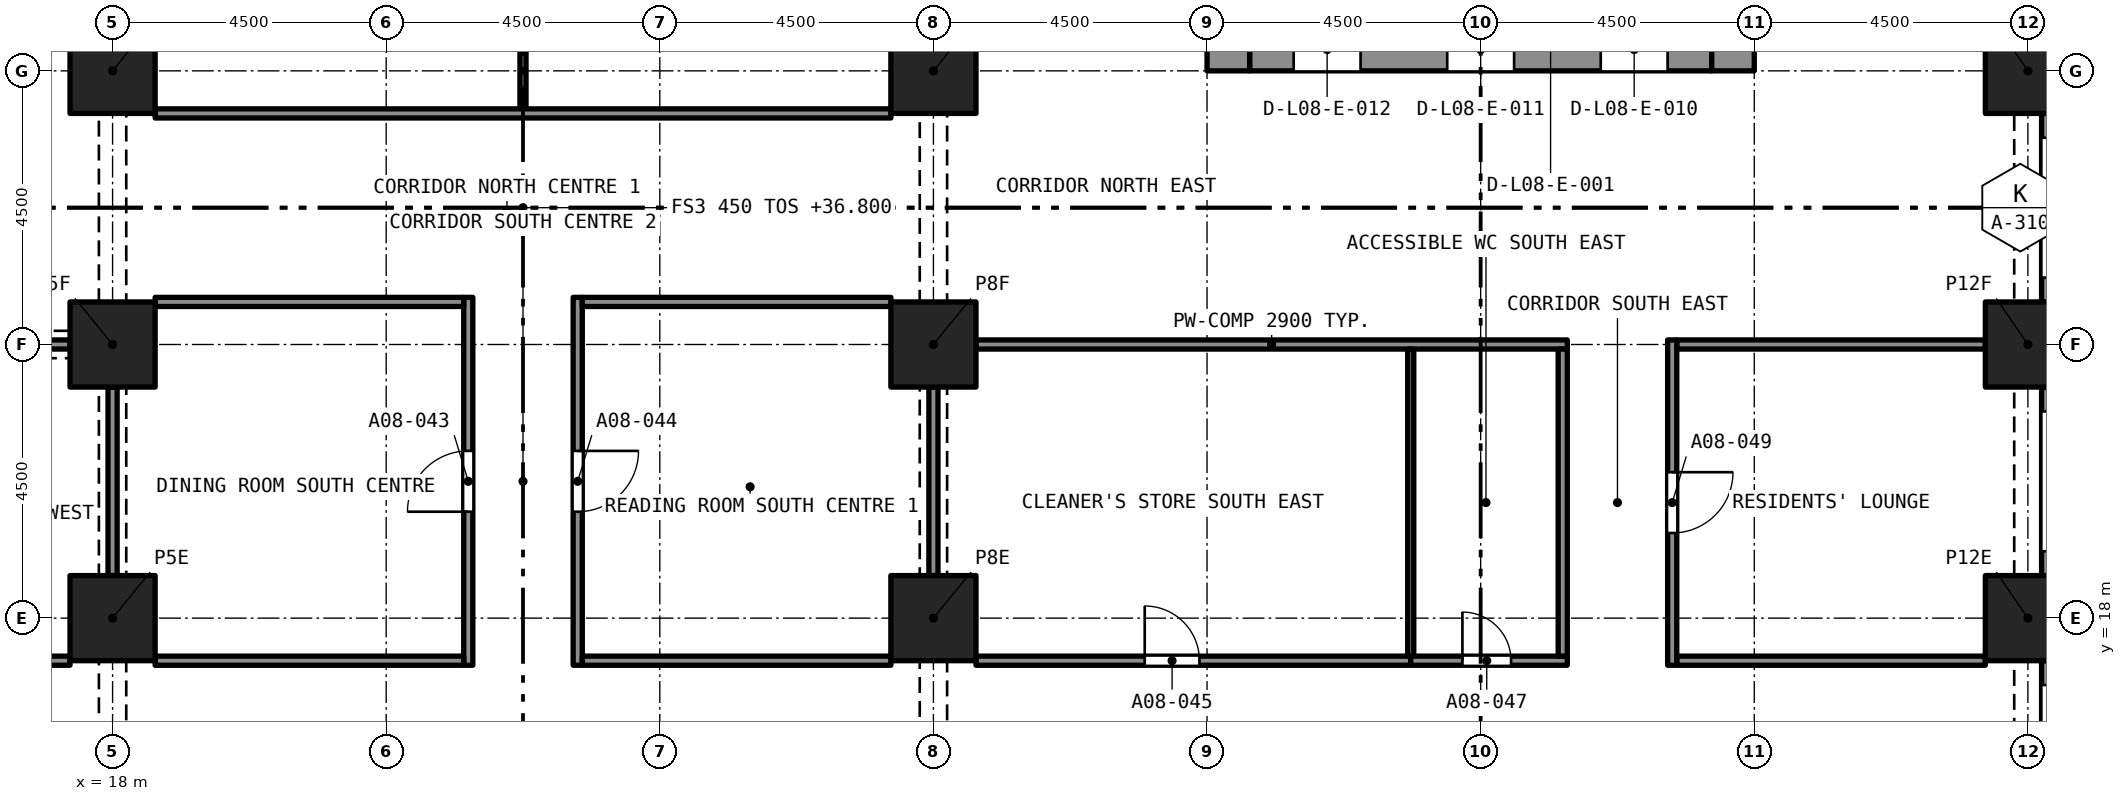
"""IFC4 building model, lengths in metres.
Left out: names, types, materials, properties, quantities, classifications, styles, units other than length and angle.
Written with IfcOpenShell. Run it as: python <this file> out.ifc"""

import sys

from ifc_helpers import new_model, si_unit, direction, frame, frame_2d, origin, origin_2d, place, context, subcontext, project, spatial, rectangle, extrude, element, fill, save


model = new_model("IFC4")
c1 = context("Model", 3, precision=1e-05, world=origin(), true_north=direction((0.0, 1.0)))
c2 = subcontext(c1, "Body", "Model", "MODEL_VIEW")
j1 = project(units=[si_unit("LENGTHUNIT", "METRE"), si_unit("PLANEANGLEUNIT", "RADIAN")], contexts=[c1])
p1 = place(None, origin())
s1 = spatial("IfcSite", under=j1, at=p1, CompositionType="ELEMENT")
p2 = place(p1, origin())
s2 = spatial("IfcBuilding", under=s1, at=p2, CompositionType="ELEMENT")
p3 = place(p2, frame((0.0, 0.0, 36.8)))
s3 = spatial("IfcBuildingStorey", under=s2, at=p3, CompositionType="ELEMENT", Elevation=36.8)
for number, where, z_axis, x_axis in (
    (1, (18.0, 18.0, 0.0), (0.0, 0.0, 1.0), (1.0, 0.0, 0.0)),
    (2, (31.5, 18.0, 0.0), (0.0, 0.0, 1.0), (1.0, 0.0, 0.0)),
    (3, (49.5, 18.0, 0.0), (0.0, 0.0, 1.0), (1.0, 0.0, 0.0)),
    (4, (18.0, 22.5, 0.0), (0.0, 0.0, 1.0), (1.0, 0.0, 0.0)),
    (5, (31.5, 22.5, 0.0), (0.0, 0.0, 1.0), (1.0, 0.0, 0.0)),
    (6, (49.5, 22.5, 0.0), (0.0, 0.0, 1.0), (1.0, 0.0, 0.0)),
    (7, (18.0, 27.0, 0.0), (0.0, 0.0, 1.0), (1.0, 0.0, 0.0)),
    (8, (31.5, 27.0, 0.0), (0.0, 0.0, 1.0), (1.0, 0.0, 0.0)),
    (9, (49.5, 27.0, 0.0), (0.0, 0.0, 1.0), (1.0, 0.0, 0.0)),
):
    element("IfcColumn", number, at=place(p3, frame(where, z_axis=z_axis, x_axis=x_axis)), inside=s3, PredefinedType="COLUMN", context=c2, shape_type="SweptSolid", body=[
        extrude(rectangle(XDim=1.4, YDim=1.4, at=origin_2d()), origin(), (0.0, 0.0, 1.0), 3.2),
    ])
p4 = place(p3, frame((36.7, 27.35, 0.0), z_axis=(0.0, 0.0, 1.0), x_axis=(1.0, 0.0, 0.0)))
e10 = element("IfcWall", 10, at=p4, inside=s3, PredefinedType="SOLIDWALL", context=c2, shape_type="SweptSolid", body=[
    extrude(rectangle(XDim=7.6, YDim=0.7, at=frame_2d((3.8, 0.0))), origin(), (0.0, 0.0, 1.0), 3.2),
])
p5 = place(p4, frame((5.775, 0.0, 0.0)))
e11 = element("IfcOpeningElement", 11, at=p5, cuts=e10, PredefinedType="OPENING", context=c2, shape_type="SweptSolid", body=[
    extrude(rectangle(XDim=1.1, YDim=2.1, at=frame_2d((0.55, 1.05))), frame((0.0, 0.36, 0.0), z_axis=(0.0, -1.0, 0.0), x_axis=(1.0, 0.0, 0.0)), (0.0, 0.0, 1.0), 0.72),
])
p6 = place(p4, frame((3.25, 0.0, 0.0)))
e12 = element("IfcOpeningElement", 12, at=p6, cuts=e10, PredefinedType="OPENING", context=c2, shape_type="SweptSolid", body=[
    extrude(rectangle(XDim=1.1, YDim=2.1, at=frame_2d((0.55, 1.05))), frame((0.0, 0.36, 0.0), z_axis=(0.0, -1.0, 0.0), x_axis=(1.0, 0.0, 0.0)), (0.0, 0.0, 1.0), 0.72),
])
p7 = place(p4, frame((0.725, 0.0, 0.0)))
e13 = element("IfcOpeningElement", 13, at=p7, cuts=e10, PredefinedType="OPENING", context=c2, shape_type="SweptSolid", body=[
    extrude(rectangle(XDim=1.1, YDim=2.1, at=frame_2d((0.55, 1.05))), frame((0.0, 0.36, 0.0), z_axis=(0.0, -1.0, 0.0), x_axis=(1.0, 0.0, 0.0)), (0.0, 0.0, 1.0), 0.72),
])
p8 = place(p3, frame((36.35, 27.0, 0.0), z_axis=(0.0, 0.0, 1.0), x_axis=(0.0, 1.0, 0.0)))
e14 = element("IfcWall", 14, at=p8, inside=s3, PredefinedType="SOLIDWALL", context=c2, shape_type="SweptSolid", body=[
    extrude(rectangle(XDim=13.5, YDim=0.7, at=frame_2d((6.75, 0.0))), origin(), (0.0, 0.0, 1.0), 3.2),
])
p9 = place(p8, frame((8.95, 0.0, 0.0)))
e15 = element("IfcOpeningElement", 15, at=p9, cuts=e14, PredefinedType="OPENING", context=c2, shape_type="SweptSolid", body=[
    extrude(rectangle(XDim=1.2, YDim=2.1, at=frame_2d((0.6, 1.05))), frame((0.0, 0.36, 0.0), z_axis=(0.0, -1.0, 0.0), x_axis=(1.0, 0.0, 0.0)), (0.0, 0.0, 1.0), 0.72),
])
p10 = place(p3, frame((44.65, 27.0, 0.0), z_axis=(0.0, 0.0, 1.0), x_axis=(0.0, 1.0, 0.0)))
e16 = element("IfcWall", 16, at=p10, inside=s3, PredefinedType="SOLIDWALL", context=c2, shape_type="SweptSolid", body=[
    extrude(rectangle(XDim=13.5, YDim=0.7, at=frame_2d((6.75, 0.0))), origin(), (0.0, 0.0, 1.0), 3.2),
])
p11 = place(p10, frame((8.95, 0.0, 0.0)))
e17 = element("IfcOpeningElement", 17, at=p11, cuts=e16, PredefinedType="OPENING", context=c2, shape_type="SweptSolid", body=[
    extrude(rectangle(XDim=1.2, YDim=2.1, at=frame_2d((0.6, 1.05))), frame((0.0, 0.36, 0.0), z_axis=(0.0, -1.0, 0.0), x_axis=(1.0, 0.0, 0.0)), (0.0, 0.0, 1.0), 0.72),
])
p12 = place(p3, frame((49.875, 17.3, 0.0), z_axis=(0.0, 0.0, 1.0), x_axis=(0.0, -1.0, 0.0)))
e18 = element("IfcWall", 18, at=p12, inside=s3, PredefinedType="SOLIDWALL", context=c2, shape_type="SweptSolid", body=[
    extrude(rectangle(XDim=3.1, YDim=0.3, at=frame_2d((1.55, 0.0))), origin(), (0.0, 0.0, 1.0), 3.2),
])
p13 = place(p12, frame((0.4, 0.0, 0.45)))
e19 = element("IfcOpeningElement", 19, at=p13, cuts=e18, PredefinedType="OPENING", context=c2, shape_type="SweptSolid", body=[
    extrude(rectangle(XDim=2.3, YDim=1.95, at=frame_2d((1.15, 0.975))), frame((0.0, 0.16, 0.0), z_axis=(0.0, -1.0, 0.0), x_axis=(1.0, 0.0, 0.0)), (0.0, 0.0, 1.0), 0.32),
])
p14 = place(p3, frame((49.875, 21.8, 0.0), z_axis=(0.0, 0.0, 1.0), x_axis=(0.0, -1.0, 0.0)))
e20 = element("IfcWall", 20, at=p14, inside=s3, PredefinedType="SOLIDWALL", context=c2, shape_type="SweptSolid", body=[
    extrude(rectangle(XDim=3.1, YDim=0.3, at=frame_2d((1.55, 0.0))), origin(), (0.0, 0.0, 1.0), 3.2),
])
p15 = place(p14, frame((0.4, 0.0, 0.45)))
e21 = element("IfcOpeningElement", 21, at=p15, cuts=e20, PredefinedType="OPENING", context=c2, shape_type="SweptSolid", body=[
    extrude(rectangle(XDim=2.3, YDim=1.95, at=frame_2d((1.15, 0.975))), frame((0.0, 0.16, 0.0), z_axis=(0.0, -1.0, 0.0), x_axis=(1.0, 0.0, 0.0)), (0.0, 0.0, 1.0), 0.32),
])
p16 = place(p3, frame((49.875, 26.3, 0.0), z_axis=(0.0, 0.0, 1.0), x_axis=(0.0, -1.0, 0.0)))
e22 = element("IfcWall", 22, at=p16, inside=s3, PredefinedType="SOLIDWALL", context=c2, shape_type="SweptSolid", body=[
    extrude(rectangle(XDim=3.1, YDim=0.3, at=frame_2d((1.55, 0.0))), origin(), (0.0, 0.0, 1.0), 3.2),
])
p17 = place(p16, frame((0.4, 0.0, 0.45)))
e23 = element("IfcOpeningElement", 23, at=p17, cuts=e22, PredefinedType="OPENING", context=c2, shape_type="SweptSolid", body=[
    extrude(rectangle(XDim=2.3, YDim=1.95, at=frame_2d((1.15, 0.975))), frame((0.0, 0.16, 0.0), z_axis=(0.0, -1.0, 0.0), x_axis=(1.0, 0.0, 0.0)), (0.0, 0.0, 1.0), 0.32),
])
p18 = place(p3, frame((23.85, 17.225, 0.0), z_axis=(0.0, 0.0, 1.0), x_axis=(0.0, 1.0, 0.0)))
e24 = element("IfcWall", 24, at=p18, inside=s3, PredefinedType="PARTITIONING", context=c2, shape_type="SweptSolid", body=[
    extrude(rectangle(XDim=6.05, YDim=0.15, at=frame_2d((3.025, 0.0))), origin(), (0.0, 0.0, 1.0), 2.75),
])
p19 = place(p18, frame((2.525, 0.0, 0.0)))
e25 = element("IfcOpeningElement", 25, at=p19, cuts=e24, PredefinedType="OPENING", context=c2, shape_type="SweptSolid", body=[
    extrude(rectangle(XDim=1.0, YDim=2.1, at=frame_2d((0.5, 1.05))), frame((0.0, 0.085, 0.0), z_axis=(0.0, -1.0, 0.0), x_axis=(1.0, 0.0, 0.0)), (0.0, 0.0, 1.0), 0.17),
])
p20 = place(p3, frame((25.65, 23.275, 0.0), z_axis=(0.0, 0.0, 1.0), x_axis=(0.0, -1.0, 0.0)))
e26 = element("IfcWall", 26, at=p20, inside=s3, PredefinedType="PARTITIONING", context=c2, shape_type="SweptSolid", body=[
    extrude(rectangle(XDim=6.05, YDim=0.15, at=frame_2d((3.025, 0.0))), origin(), (0.0, 0.0, 1.0), 2.75),
])
p21 = place(p20, frame((2.525, 0.0, 0.0)))
e27 = element("IfcOpeningElement", 27, at=p21, cuts=e26, PredefinedType="OPENING", context=c2, shape_type="SweptSolid", body=[
    extrude(rectangle(XDim=1.0, YDim=2.1, at=frame_2d((0.5, 1.05))), frame((0.0, 0.085, 0.0), z_axis=(0.0, -1.0, 0.0), x_axis=(1.0, 0.0, 0.0)), (0.0, 0.0, 1.0), 0.17),
])
for number, where, z_axis, x_axis in (
    (28, (18.7, 17.3, 0.0), (0.0, 0.0, 1.0), (1.0, 0.0, 0.0)),
    (29, (25.725, 17.3, 0.0), (0.0, 0.0, 1.0), (1.0, 0.0, 0.0)),
):
    element("IfcWall", number, at=place(p3, frame(where, z_axis=z_axis, x_axis=x_axis)), inside=s3, PredefinedType="PARTITIONING", context=c2, shape_type="SweptSolid", body=[
        extrude(rectangle(XDim=5.075, YDim=0.15, at=frame_2d((2.538, 0.0))), origin(), (0.0, 0.0, 1.0), 2.75),
    ])
p22 = place(p3, frame((32.2, 17.3, 0.0), z_axis=(0.0, 0.0, 1.0), x_axis=(1.0, 0.0, 0.0)))
e30 = element("IfcWall", 30, at=p22, inside=s3, PredefinedType="PARTITIONING", context=c2, shape_type="SweptSolid", body=[
    extrude(rectangle(XDim=7.15, YDim=0.15, at=frame_2d((3.575, 0.0))), origin(), (0.0, 0.0, 1.0), 2.9),
])
p23 = place(p22, frame((2.775, 0.0, 0.0)))
e31 = element("IfcOpeningElement", 31, at=p23, cuts=e30, PredefinedType="OPENING", context=c2, shape_type="SweptSolid", body=[
    extrude(rectangle(XDim=0.9, YDim=2.1, at=frame_2d((0.45, 1.05))), frame((0.0, 0.085, 0.0), z_axis=(0.0, -1.0, 0.0), x_axis=(1.0, 0.0, 0.0)), (0.0, 0.0, 1.0), 0.17),
])
p24 = place(p3, frame((10.15, 17.3, 0.0), z_axis=(0.0, 0.0, 1.0), x_axis=(1.0, 0.0, 0.0)))
e32 = element("IfcWall", 32, at=p24, inside=s3, PredefinedType="PARTITIONING", context=c2, shape_type="SweptSolid", body=[
    extrude(rectangle(XDim=7.15, YDim=0.15, at=frame_2d((3.575, 0.0))), origin(), (0.0, 0.0, 1.0), 2.9),
])
p25 = place(p24, frame((3.475, 0.0, 0.0)))
e33 = element("IfcOpeningElement", 33, at=p25, cuts=e32, PredefinedType="OPENING", context=c2, shape_type="SweptSolid", body=[
    extrude(rectangle(XDim=0.9, YDim=2.1, at=frame_2d((0.45, 1.05))), frame((0.0, 0.085, 0.0), z_axis=(0.0, -1.0, 0.0), x_axis=(1.0, 0.0, 0.0)), (0.0, 0.0, 1.0), 0.17),
])
p26 = place(p3, frame((39.35, 17.3, 0.0), z_axis=(0.0, 0.0, 1.0), x_axis=(1.0, 0.0, 0.0)))
e34 = element("IfcWall", 34, at=p26, inside=s3, PredefinedType="PARTITIONING", context=c2, shape_type="SweptSolid", body=[
    extrude(rectangle(XDim=2.575, YDim=0.15, at=frame_2d((1.288, 0.0))), origin(), (0.0, 0.0, 1.0), 2.9),
])
p27 = place(p26, frame((0.85, 0.0, 0.0)))
e35 = element("IfcOpeningElement", 35, at=p27, cuts=e34, PredefinedType="OPENING", context=c2, shape_type="SweptSolid", body=[
    extrude(rectangle(XDim=0.8, YDim=2.1, at=frame_2d((0.4, 1.05))), frame((0.0, 0.085, 0.0), z_axis=(0.0, -1.0, 0.0), x_axis=(1.0, 0.0, 0.0)), (0.0, 0.0, 1.0), 0.17),
])
p28 = place(p3, frame((43.725, 17.3, 0.0), z_axis=(0.0, 0.0, 1.0), x_axis=(1.0, 0.0, 0.0)))
e36 = element("IfcWall", 36, at=p28, inside=s3, PredefinedType="PARTITIONING", context=c2, shape_type="SweptSolid", body=[
    extrude(rectangle(XDim=5.075, YDim=0.15, at=frame_2d((2.538, 0.0))), origin(), (0.0, 0.0, 1.0), 2.9),
])
p29 = place(p3, frame((24.75, 26.375, 0.0), z_axis=(0.0, 0.0, 1.0), x_axis=(0.0, 1.0, 0.0)))
e37 = element("IfcWall", 37, at=p29, inside=s3, PredefinedType="PARTITIONING", context=c2, shape_type="SweptSolid", body=[
    extrude(rectangle(XDim=10.25, YDim=0.1, at=frame_2d((5.125, 0.0))), origin(), (0.0, 0.0, 1.0), 2.75),
])
p30 = place(p3, frame((18.7, 26.3, 0.0), z_axis=(0.0, 0.0, 1.0), x_axis=(1.0, 0.0, 0.0)))
e38 = element("IfcWall", 38, at=p30, inside=s3, PredefinedType="PARTITIONING", context=c2, shape_type="SweptSolid", body=[
    extrude(rectangle(XDim=12.1, YDim=0.15, at=frame_2d((6.05, 0.0))), origin(), (0.0, 0.0, 1.0), 2.75),
])
p31 = place(p3, frame((18.7, 23.2, 0.0), z_axis=(0.0, 0.0, 1.0), x_axis=(1.0, 0.0, 0.0)))
e39 = element("IfcWall", 39, at=p31, inside=s3, PredefinedType="PARTITIONING", context=c2, shape_type="SweptSolid", body=[
    extrude(rectangle(XDim=5.075, YDim=0.15, at=frame_2d((2.538, 0.0))), origin(), (0.0, 0.0, 1.0), 2.75),
])
p32 = place(p3, frame((18.0, 18.7, 0.0), z_axis=(0.0, 0.0, 1.0), x_axis=(0.0, 1.0, 0.0)))
e40 = element("IfcWall", 40, at=p32, inside=s3, PredefinedType="PARTITIONING", context=c2, shape_type="SweptSolid", body=[
    extrude(rectangle(XDim=3.1, YDim=0.15, at=frame_2d((1.55, 0.0))), origin(), (0.0, 0.0, 1.0), 2.38),
])
p33 = place(p3, frame((25.725, 23.2, 0.0), z_axis=(0.0, 0.0, 1.0), x_axis=(1.0, 0.0, 0.0)))
e41 = element("IfcWall", 41, at=p33, inside=s3, PredefinedType="PARTITIONING", context=c2, shape_type="SweptSolid", body=[
    extrude(rectangle(XDim=5.075, YDim=0.15, at=frame_2d((2.538, 0.0))), origin(), (0.0, 0.0, 1.0), 2.75),
])
p34 = place(p3, frame((31.5, 18.7, 0.0), z_axis=(0.0, 0.0, 1.0), x_axis=(0.0, 1.0, 0.0)))
e42 = element("IfcWall", 42, at=p34, inside=s3, PredefinedType="PARTITIONING", context=c2, shape_type="SweptSolid", body=[
    extrude(rectangle(XDim=3.1, YDim=0.15, at=frame_2d((1.55, 0.0))), origin(), (0.0, 0.0, 1.0), 2.38),
])
p35 = place(p3, frame((32.2, 22.5, 0.0), z_axis=(0.0, 0.0, 1.0), x_axis=(1.0, 0.0, 0.0)))
e43 = element("IfcWall", 43, at=p35, inside=s3, PredefinedType="PARTITIONING", context=c2, shape_type="SweptSolid", body=[
    extrude(rectangle(XDim=9.725, YDim=0.15, at=frame_2d((4.863, 0.0))), origin(), (0.0, 0.0, 1.0), 2.9),
])
p36 = place(p3, frame((43.725, 22.5, 0.0), z_axis=(0.0, 0.0, 1.0), x_axis=(1.0, 0.0, 0.0)))
e44 = element("IfcWall", 44, at=p36, inside=s3, PredefinedType="PARTITIONING", context=c2, shape_type="SweptSolid", body=[
    extrude(rectangle(XDim=5.075, YDim=0.15, at=frame_2d((2.538, 0.0))), origin(), (0.0, 0.0, 1.0), 2.9),
])
p37 = place(p3, frame((14.2, 22.5, 0.0), z_axis=(0.0, 0.0, 1.0), x_axis=(1.0, 0.0, 0.0)))
e45 = element("IfcWall", 45, at=p37, inside=s3, PredefinedType="PARTITIONING", context=c2, shape_type="SweptSolid", body=[
    extrude(rectangle(XDim=3.1, YDim=0.15, at=frame_2d((1.55, 0.0))), origin(), (0.0, 0.0, 1.0), 2.38),
])
p38 = place(p3, frame((41.85, 17.375, 0.0), z_axis=(0.0, 0.0, 1.0), x_axis=(0.0, 1.0, 0.0)))
e46 = element("IfcWall", 46, at=p38, inside=s3, PredefinedType="PARTITIONING", context=c2, shape_type="SweptSolid", body=[
    extrude(rectangle(XDim=5.05, YDim=0.15, at=frame_2d((2.525, 0.0))), origin(), (0.0, 0.0, 1.0), 2.9),
])
p39 = place(p3, frame((43.65, 22.575, 0.0), z_axis=(0.0, 0.0, 1.0), x_axis=(0.0, -1.0, 0.0)))
e47 = element("IfcWall", 47, at=p39, inside=s3, PredefinedType="PARTITIONING", context=c2, shape_type="SweptSolid", body=[
    extrude(rectangle(XDim=5.35, YDim=0.15, at=frame_2d((2.675, 0.0))), origin(), (0.0, 0.0, 1.0), 2.9),
])
p40 = place(p39, frame((2.175, 0.0, 0.0)))
e48 = element("IfcOpeningElement", 48, at=p40, cuts=e47, PredefinedType="OPENING", context=c2, shape_type="SweptSolid", body=[
    extrude(rectangle(XDim=1.0, YDim=2.1, at=frame_2d((0.5, 1.05))), frame((0.0, 0.085, 0.0), z_axis=(0.0, -1.0, 0.0), x_axis=(1.0, 0.0, 0.0)), (0.0, 0.0, 1.0), 0.17),
])
p41 = place(p3, frame((39.35, 17.375, 0.0), z_axis=(0.0, 0.0, 1.0), x_axis=(0.0, 1.0, 0.0)))
e49 = element("IfcWall", 49, at=p41, inside=s3, PredefinedType="PARTITIONING", context=c2, shape_type="SweptSolid", body=[
    extrude(rectangle(XDim=5.05, YDim=0.1, at=frame_2d((2.525, 0.0))), origin(), (0.0, 0.0, 1.0), 2.9),
])
p42 = place(p19, origin())
e50 = element("IfcDoor", 50, at=p42, inside=s3, OperationType="SINGLE_SWING_RIGHT", PredefinedType="DOOR", context=c2, shape_type="SweptSolid", body=[
    extrude(rectangle(XDim=1.0, YDim=2.1, at=frame_2d((0.5, 1.05))), frame((0.0, 0.025, 0.0), z_axis=(0.0, -1.0, 0.0), x_axis=(1.0, 0.0, 0.0)), (0.0, 0.0, 1.0), 0.05),
])
fill(e25, e50)
p43 = place(p21, origin())
e51 = element("IfcDoor", 51, at=p43, inside=s3, OperationType="SINGLE_SWING_RIGHT", PredefinedType="DOOR", context=c2, shape_type="SweptSolid", body=[
    extrude(rectangle(XDim=1.0, YDim=2.1, at=frame_2d((0.5, 1.05))), frame((0.0, 0.025, 0.0), z_axis=(0.0, -1.0, 0.0), x_axis=(1.0, 0.0, 0.0)), (0.0, 0.0, 1.0), 0.05),
])
fill(e27, e51)
p44 = place(p23, origin())
e52 = element("IfcDoor", 52, at=p44, inside=s3, OperationType="SINGLE_SWING_LEFT", PredefinedType="DOOR", context=c2, shape_type="SweptSolid", body=[
    extrude(rectangle(XDim=0.9, YDim=2.1, at=frame_2d((0.45, 1.05))), frame((0.0, 0.025, 0.0), z_axis=(0.0, -1.0, 0.0), x_axis=(1.0, 0.0, 0.0)), (0.0, 0.0, 1.0), 0.05),
])
fill(e31, e52)
p45 = place(p27, origin())
e53 = element("IfcDoor", 53, at=p45, inside=s3, OperationType="SINGLE_SWING_LEFT", PredefinedType="DOOR", context=c2, shape_type="SweptSolid", body=[
    extrude(rectangle(XDim=0.8, YDim=2.1, at=frame_2d((0.4, 1.05))), frame((0.0, 0.025, 0.0), z_axis=(0.0, -1.0, 0.0), x_axis=(1.0, 0.0, 0.0)), (0.0, 0.0, 1.0), 0.05),
])
fill(e35, e53)
p46 = place(p40, origin())
e54 = element("IfcDoor", 54, at=p46, inside=s3, OperationType="SINGLE_SWING_RIGHT", PredefinedType="DOOR", context=c2, shape_type="SweptSolid", body=[
    extrude(rectangle(XDim=1.0, YDim=2.1, at=frame_2d((0.5, 1.05))), frame((0.0, 0.025, 0.0), z_axis=(0.0, -1.0, 0.0), x_axis=(1.0, 0.0, 0.0)), (0.0, 0.0, 1.0), 0.05),
])
fill(e48, e54)
save(model, sys.argv[1])
